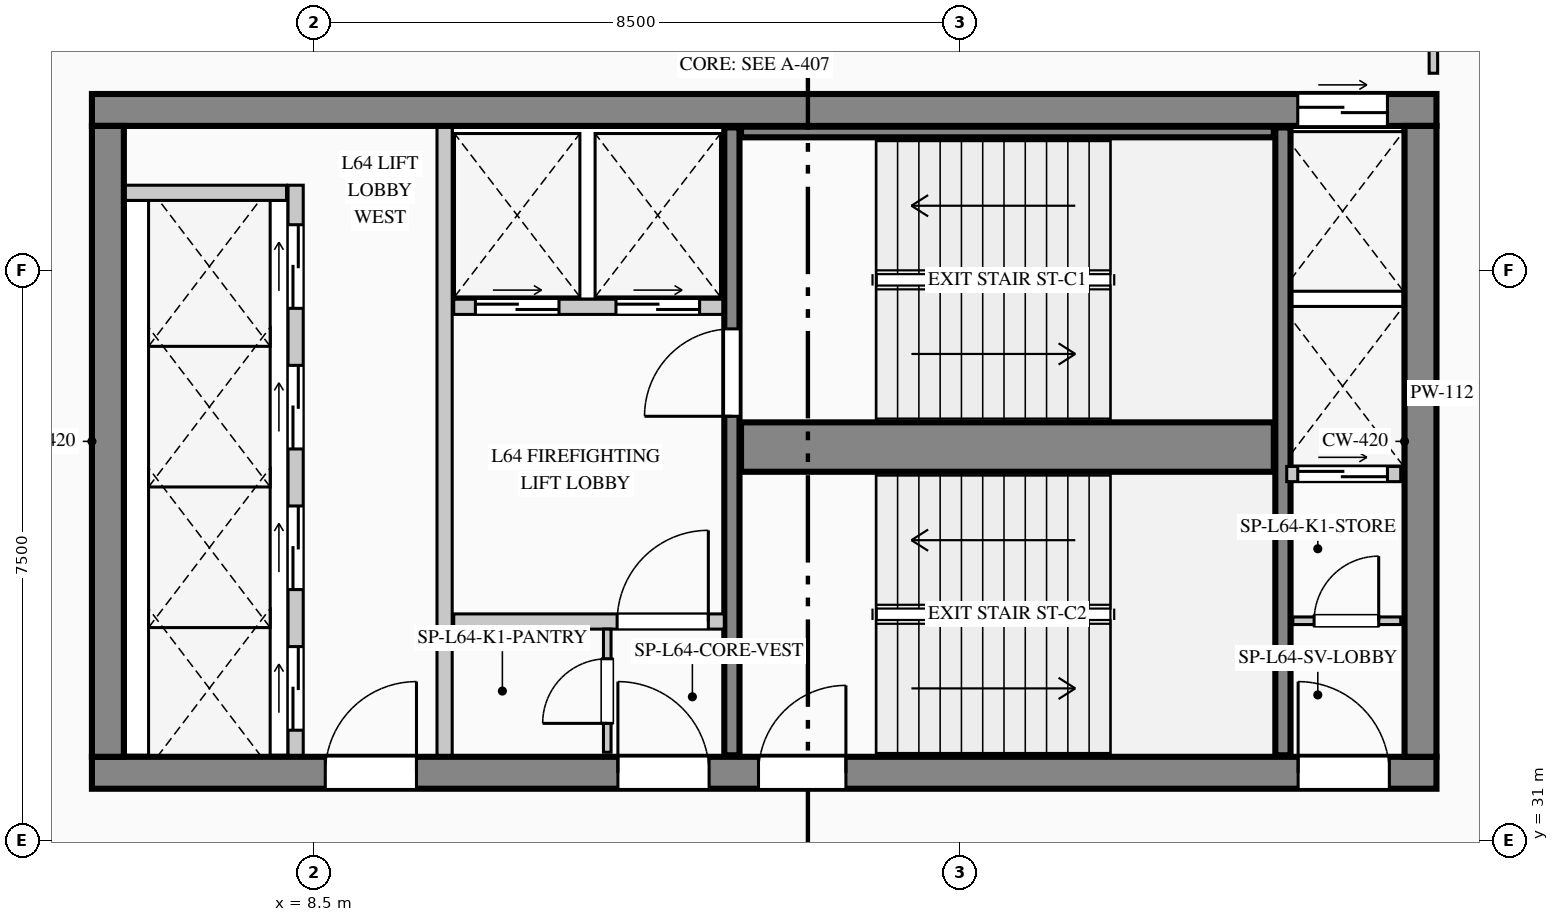
"""IFC4 building model, lengths in metres.
Left out: names, types, materials, properties, quantities, classifications, styles, units other than length and angle.
Written with IfcOpenShell. Run it as: python <this file> out.ifc"""

import sys

from ifc_helpers import new_model, si_unit, direction, frame, frame_2d, origin, place, context, subcontext, project, spatial, rectangle, extrude, element, fill, save


model = new_model("IFC4")
c1 = context("Model", 3, precision=1e-05, world=origin(), true_north=direction((0.0, 1.0)))
c2 = subcontext(c1, "Body", "Model", "MODEL_VIEW")
j1 = project(units=[si_unit("LENGTHUNIT", "METRE"), si_unit("PLANEANGLEUNIT", "RADIAN")], contexts=[c1])
p1 = place(None, origin())
s1 = spatial("IfcSite", under=j1, at=p1, CompositionType="ELEMENT")
p2 = place(p1, origin())
s2 = spatial("IfcBuilding", under=s1, at=p2, CompositionType="ELEMENT")
p3 = place(p2, frame((0.0, 0.0, 268.55)))
s3 = spatial("IfcBuildingStorey", under=s2, at=p3, CompositionType="ELEMENT", Elevation=268.55)
p4 = place(p3, frame((5.58, 40.61, 0.0), z_axis=(0.0, 0.0, 1.0), x_axis=(1.0, 0.0, 0.0)))
e1 = element("IfcWall", 1, at=p4, inside=s3, PredefinedType="SHEAR", context=c2, shape_type="SweptSolid", body=[
    extrude(rectangle(XDim=17.69, YDim=0.42, at=frame_2d((8.845, 0.0))), origin(), (0.0, 0.0, 1.0), 3.95),
])
p5 = place(p4, frame((15.865, 0.0, 0.0)))
e2 = element("IfcOpeningElement", 2, at=p5, cuts=e1, PredefinedType="OPENING", context=c2, shape_type="SweptSolid", body=[
    extrude(rectangle(XDim=1.18, YDim=2.25, at=frame_2d((0.59, 1.125))), frame((0.0, 0.22, 0.0), z_axis=(0.0, -1.0, 0.0), x_axis=(1.0, 0.0, 0.0)), (0.0, 0.0, 1.0), 0.44),
])
p6 = place(p3, frame((5.58, 31.89, 0.0), z_axis=(0.0, 0.0, 1.0), x_axis=(1.0, 0.0, 0.0)))
e3 = element("IfcWall", 3, at=p6, inside=s3, PredefinedType="SHEAR", context=c2, shape_type="SweptSolid", body=[
    extrude(rectangle(XDim=17.69, YDim=0.42, at=frame_2d((8.845, 0.0))), origin(), (0.0, 0.0, 1.0), 3.95),
])
p7 = place(p6, frame((3.07, 0.0, 0.0)))
e4 = element("IfcOpeningElement", 4, at=p7, cuts=e3, PredefinedType="OPENING", context=c2, shape_type="SweptSolid", body=[
    extrude(rectangle(XDim=1.2, YDim=2.2, at=frame_2d((0.6, 1.1))), frame((0.0, 0.22, 0.0), z_axis=(0.0, -1.0, 0.0), x_axis=(1.0, 0.0, 0.0)), (0.0, 0.0, 1.0), 0.44),
])
p8 = place(p6, frame((6.92, 0.0, 0.0)))
e5 = element("IfcOpeningElement", 5, at=p8, cuts=e3, PredefinedType="OPENING", context=c2, shape_type="SweptSolid", body=[
    extrude(rectangle(XDim=1.2, YDim=2.2, at=frame_2d((0.6, 1.1))), frame((0.0, 0.22, 0.0), z_axis=(0.0, -1.0, 0.0), x_axis=(1.0, 0.0, 0.0)), (0.0, 0.0, 1.0), 0.44),
])
p9 = place(p6, frame((8.77, 0.0, 0.0)))
e6 = element("IfcOpeningElement", 6, at=p9, cuts=e3, PredefinedType="OPENING", context=c2, shape_type="SweptSolid", body=[
    extrude(rectangle(XDim=1.15, YDim=2.2, at=frame_2d((0.575, 1.1))), frame((0.0, 0.22, 0.0), z_axis=(0.0, -1.0, 0.0), x_axis=(1.0, 0.0, 0.0)), (0.0, 0.0, 1.0), 0.44),
])
p10 = place(p6, frame((15.87, 0.0, 0.0)))
e7 = element("IfcOpeningElement", 7, at=p10, cuts=e3, PredefinedType="OPENING", context=c2, shape_type="SweptSolid", body=[
    extrude(rectangle(XDim=1.2, YDim=2.2, at=frame_2d((0.6, 1.1))), frame((0.0, 0.22, 0.0), z_axis=(0.0, -1.0, 0.0), x_axis=(1.0, 0.0, 0.0)), (0.0, 0.0, 1.0), 0.44),
])
for number, where, z_axis, x_axis in (
    (8, (5.79, 32.1, 0.0), (0.0, 0.0, 1.0), (0.0, 1.0, 0.0)),
    (9, (23.06, 32.1, 0.0), (0.0, 0.0, 1.0), (0.0, 1.0, 0.0)),
):
    element("IfcWall", number, at=place(p3, frame(where, z_axis=z_axis, x_axis=x_axis)), inside=s3, PredefinedType="SHEAR", context=c2, shape_type="SweptSolid", body=[
        extrude(rectangle(XDim=8.3, YDim=0.42, at=frame_2d((4.15, 0.0))), origin(), (0.0, 0.0, 1.0), 3.95),
    ])
p11 = place(p3, frame((14.0, 32.12, 0.0), z_axis=(0.0, 0.0, 1.0), x_axis=(0.0, 1.0, 0.0)))
e10 = element("IfcWall", 10, at=p11, inside=s3, PredefinedType="SHEAR", context=c2, shape_type="SweptSolid", body=[
    extrude(rectangle(XDim=8.26, YDim=0.2, at=frame_2d((4.13, 0.0))), origin(), (0.0, 0.0, 1.0), 3.95),
])
p12 = place(p11, frame((4.46, 0.0, 0.0)))
e11 = element("IfcOpeningElement", 11, at=p12, cuts=e10, PredefinedType="OPENING", context=c2, shape_type="SweptSolid", body=[
    extrude(rectangle(XDim=1.15, YDim=2.2, at=frame_2d((0.575, 1.1))), frame((0.0, 0.11, 0.0), z_axis=(0.0, -1.0, 0.0), x_axis=(1.0, 0.0, 0.0)), (0.0, 0.0, 1.0), 0.22),
])
p13 = place(p3, frame((14.12, 36.175, 0.0), z_axis=(0.0, 0.0, 1.0), x_axis=(1.0, 0.0, 0.0)))
e12 = element("IfcWall", 12, at=p13, inside=s3, PredefinedType="SHEAR", context=c2, shape_type="SweptSolid", body=[
    extrude(rectangle(XDim=7.01, YDim=0.65, at=frame_2d((3.505, 0.0))), origin(), (0.0, 0.0, 1.0), 3.95),
])
p14 = place(p3, frame((21.25, 32.12, 0.0), z_axis=(0.0, 0.0, 1.0), x_axis=(0.0, 1.0, 0.0)))
e13 = element("IfcWall", 13, at=p14, inside=s3, PredefinedType="SHEAR", context=c2, shape_type="SweptSolid", body=[
    extrude(rectangle(XDim=8.26, YDim=0.2, at=frame_2d((4.13, 0.0))), origin(), (0.0, 0.0, 1.0), 3.95),
])
p15 = place(p3, frame((14.12, 40.32, 0.0), z_axis=(0.0, 0.0, 1.0), x_axis=(1.0, 0.0, 0.0)))
e14 = element("IfcWall", 14, at=p15, inside=s3, PredefinedType="SHEAR", context=c2, shape_type="SweptSolid", body=[
    extrude(rectangle(XDim=7.01, YDim=0.14, at=frame_2d((3.505, 0.0))), origin(), (0.0, 0.0, 1.0), 3.95),
])
p16 = place(p3, frame((6.133, 4.42, 0.0), z_axis=(0.0, 0.0, 1.0), x_axis=(-0.089522678378, 0.995984784048, 0.0)))
e15 = element("IfcWall", 15, at=p16, inside=s3, PredefinedType="STANDARD", context=c2, shape_type="SweptSolid", body=[
    extrude(rectangle(XDim=37.31, YDim=0.24, at=frame_2d((18.655, 0.0))), origin(), (0.0, 0.0, 1.0), 3.7),
])
p17 = place(p16, frame((10.246, 0.0, 0.9)))
e16 = element("IfcOpeningElement", 16, at=p17, cuts=e15, PredefinedType="OPENING", context=c2, shape_type="SweptSolid", body=[
    extrude(rectangle(XDim=1.65, YDim=1.95, at=frame_2d((0.825, 0.975))), frame((0.0, 0.13, 0.0), z_axis=(0.0, -1.0, 0.0), x_axis=(1.0, 0.0, 0.0)), (0.0, 0.0, 1.0), 0.26),
])
p18 = place(p3, frame((8.26, 32.12, 0.0), z_axis=(0.0, 0.0, 1.0), x_axis=(0.0, 1.0, 0.0)))
e17 = element("IfcWall", 17, at=p18, inside=s3, PredefinedType="PARTITIONING", context=c2, shape_type="SweptSolid", body=[
    extrude(rectangle(XDim=7.5, YDim=0.2, at=frame_2d((3.75, 0.0))), origin(), (0.0, 0.0, 1.0), 3.7),
])
p19 = place(p18, frame((0.33, 0.0, 0.0)))
e18 = element("IfcOpeningElement", 18, at=p19, cuts=e17, PredefinedType="OPENING", context=c2, shape_type="SweptSolid", body=[
    extrude(rectangle(XDim=1.1, YDim=2.2, at=frame_2d((0.55, 1.1))), frame((0.0, 0.11, 0.0), z_axis=(0.0, -1.0, 0.0), x_axis=(1.0, 0.0, 0.0)), (0.0, 0.0, 1.0), 0.22),
])
p20 = place(p18, frame((2.18, 0.0, 0.0)))
e19 = element("IfcOpeningElement", 19, at=p20, cuts=e17, PredefinedType="OPENING", context=c2, shape_type="SweptSolid", body=[
    extrude(rectangle(XDim=1.1, YDim=2.2, at=frame_2d((0.55, 1.1))), frame((0.0, 0.11, 0.0), z_axis=(0.0, -1.0, 0.0), x_axis=(1.0, 0.0, 0.0)), (0.0, 0.0, 1.0), 0.22),
])
p21 = place(p18, frame((4.03, 0.0, 0.0)))
e20 = element("IfcOpeningElement", 20, at=p21, cuts=e17, PredefinedType="OPENING", context=c2, shape_type="SweptSolid", body=[
    extrude(rectangle(XDim=1.1, YDim=2.2, at=frame_2d((0.55, 1.1))), frame((0.0, 0.11, 0.0), z_axis=(0.0, -1.0, 0.0), x_axis=(1.0, 0.0, 0.0)), (0.0, 0.0, 1.0), 0.22),
])
p22 = place(p18, frame((5.88, 0.0, 0.0)))
e21 = element("IfcOpeningElement", 21, at=p22, cuts=e17, PredefinedType="OPENING", context=c2, shape_type="SweptSolid", body=[
    extrude(rectangle(XDim=1.1, YDim=2.2, at=frame_2d((0.55, 1.1))), frame((0.0, 0.11, 0.0), z_axis=(0.0, -1.0, 0.0), x_axis=(1.0, 0.0, 0.0)), (0.0, 0.0, 1.0), 0.22),
])
p23 = place(p3, frame((6.02, 39.52, 0.0), z_axis=(0.0, 0.0, 1.0), x_axis=(1.0, 0.0, 0.0)))
e22 = element("IfcWall", 22, at=p23, inside=s3, PredefinedType="PARTITIONING", context=c2, shape_type="SweptSolid", body=[
    extrude(rectangle(XDim=2.12, YDim=0.2, at=frame_2d((1.06, 0.0))), origin(), (0.0, 0.0, 1.0), 3.7),
])
p24 = place(p3, frame((10.22, 32.12, 0.0), z_axis=(0.0, 0.0, 1.0), x_axis=(0.0, 1.0, 0.0)))
e23 = element("IfcWall", 23, at=p24, inside=s3, PredefinedType="PARTITIONING", context=c2, shape_type="SweptSolid", body=[
    extrude(rectangle(XDim=8.26, YDim=0.2, at=frame_2d((4.13, 0.0))), origin(), (0.0, 0.0, 1.0), 3.7),
])
p25 = place(p3, frame((10.34, 38.02, 0.0), z_axis=(0.0, 0.0, 1.0), x_axis=(1.0, 0.0, 0.0)))
e24 = element("IfcWall", 24, at=p25, inside=s3, PredefinedType="PARTITIONING", context=c2, shape_type="SweptSolid", body=[
    extrude(rectangle(XDim=3.54, YDim=0.2, at=frame_2d((1.77, 0.0))), origin(), (0.0, 0.0, 1.0), 3.7),
])
p26 = place(p25, frame((0.285, 0.0, 0.0)))
e25 = element("IfcOpeningElement", 25, at=p26, cuts=e24, PredefinedType="OPENING", context=c2, shape_type="SweptSolid", body=[
    extrude(rectangle(XDim=1.1, YDim=2.2, at=frame_2d((0.55, 1.1))), frame((0.0, 0.11, 0.0), z_axis=(0.0, -1.0, 0.0), x_axis=(1.0, 0.0, 0.0)), (0.0, 0.0, 1.0), 0.22),
])
p27 = place(p25, frame((2.135, 0.0, 0.0)))
e26 = element("IfcOpeningElement", 26, at=p27, cuts=e24, PredefinedType="OPENING", context=c2, shape_type="SweptSolid", body=[
    extrude(rectangle(XDim=1.1, YDim=2.2, at=frame_2d((0.55, 1.1))), frame((0.0, 0.11, 0.0), z_axis=(0.0, -1.0, 0.0), x_axis=(1.0, 0.0, 0.0)), (0.0, 0.0, 1.0), 0.22),
])
p28 = place(p3, frame((10.34, 33.88, 0.0), z_axis=(0.0, 0.0, 1.0), x_axis=(1.0, 0.0, 0.0)))
e27 = element("IfcWall", 27, at=p28, inside=s3, PredefinedType="PARTITIONING", context=c2, shape_type="SweptSolid", body=[
    extrude(rectangle(XDim=3.56, YDim=0.2, at=frame_2d((1.78, 0.0))), origin(), (0.0, 0.0, 1.0), 3.7),
])
p29 = place(p28, frame((2.15, 0.0, 0.0)))
e28 = element("IfcOpeningElement", 28, at=p29, cuts=e27, PredefinedType="OPENING", context=c2, shape_type="SweptSolid", body=[
    extrude(rectangle(XDim=1.2, YDim=2.2, at=frame_2d((0.6, 1.1))), frame((0.0, 0.11, 0.0), z_axis=(0.0, -1.0, 0.0), x_axis=(1.0, 0.0, 0.0)), (0.0, 0.0, 1.0), 0.22),
])
p30 = place(p3, frame((12.36, 32.16, 0.0), z_axis=(0.0, 0.0, 1.0), x_axis=(0.0, 1.0, 0.0)))
e29 = element("IfcWall", 29, at=p30, inside=s3, PredefinedType="PARTITIONING", context=c2, shape_type="SweptSolid", body=[
    extrude(rectangle(XDim=1.62, YDim=0.1, at=frame_2d((0.81, 0.0))), origin(), (0.0, 0.0, 1.0), 3.7),
])
p31 = place(p30, frame((0.38, 0.0, 0.0)))
e30 = element("IfcOpeningElement", 30, at=p31, cuts=e29, PredefinedType="OPENING", context=c2, shape_type="SweptSolid", body=[
    extrude(rectangle(XDim=0.85, YDim=2.1, at=frame_2d((0.425, 1.05))), frame((0.0, 0.06, 0.0), z_axis=(0.0, -1.0, 0.0), x_axis=(1.0, 0.0, 0.0)), (0.0, 0.0, 1.0), 0.12),
])
p32 = place(p3, frame((21.38, 33.89, 0.0), z_axis=(0.0, 0.0, 1.0), x_axis=(1.0, 0.0, 0.0)))
e31 = element("IfcWall", 31, at=p32, inside=s3, PredefinedType="PARTITIONING", context=c2, shape_type="SweptSolid", body=[
    extrude(rectangle(XDim=1.42, YDim=0.1, at=frame_2d((0.71, 0.0))), origin(), (0.0, 0.0, 1.0), 3.7),
])
p33 = place(p32, frame((0.28, 0.0, 0.0)))
e32 = element("IfcOpeningElement", 32, at=p33, cuts=e31, PredefinedType="OPENING", context=c2, shape_type="SweptSolid", body=[
    extrude(rectangle(XDim=0.85, YDim=2.1, at=frame_2d((0.425, 1.05))), frame((0.0, 0.06, 0.0), z_axis=(0.0, -1.0, 0.0), x_axis=(1.0, 0.0, 0.0)), (0.0, 0.0, 1.0), 0.12),
])
p34 = place(p3, frame((21.3, 35.82, 0.0), z_axis=(0.0, 0.0, 1.0), x_axis=(1.0, 0.0, 0.0)))
e33 = element("IfcWall", 33, at=p34, inside=s3, PredefinedType="PARTITIONING", context=c2, shape_type="SweptSolid", body=[
    extrude(rectangle(XDim=1.5, YDim=0.2, at=frame_2d((0.75, 0.0))), origin(), (0.0, 0.0, 1.0), 3.7),
])
p35 = place(p34, frame((0.145, 0.0, 0.0)))
e34 = element("IfcOpeningElement", 34, at=p35, cuts=e33, PredefinedType="OPENING", context=c2, shape_type="SweptSolid", body=[
    extrude(rectangle(XDim=1.18, YDim=2.25, at=frame_2d((0.59, 1.125))), frame((0.0, 0.11, 0.0), z_axis=(0.0, -1.0, 0.0), x_axis=(1.0, 0.0, 0.0)), (0.0, 0.0, 1.0), 0.22),
])
p36 = place(p3, frame((23.23, 41.093, 0.0), z_axis=(0.0, 0.0, 1.0), x_axis=(-0.002685455238, 0.999996394159, 0.0)))
e35 = element("IfcWall", 35, at=p36, inside=s3, PredefinedType="PARTITIONING", context=c2, shape_type="SweptSolid", body=[
    extrude(rectangle(XDim=2.182, YDim=0.112, at=frame_2d((1.091, 0.0))), origin(), (0.0, 0.0, 1.0), 3.7),
])
p37 = place(p7, origin())
e36 = element("IfcDoor", 36, at=p37, inside=s3, OperationType="SINGLE_SWING_RIGHT", PredefinedType="DOOR", context=c2, shape_type="SweptSolid", body=[
    extrude(rectangle(XDim=1.2, YDim=2.2, at=frame_2d((0.6, 1.1))), frame((0.0, 0.025, 0.0), z_axis=(0.0, -1.0, 0.0), x_axis=(1.0, 0.0, 0.0)), (0.0, 0.0, 1.0), 0.05),
])
fill(e4, e36)
p38 = place(p8, origin())
e37 = element("IfcDoor", 37, at=p38, inside=s3, OperationType="SINGLE_SWING_LEFT", PredefinedType="DOOR", context=c2, shape_type="SweptSolid", body=[
    extrude(rectangle(XDim=1.2, YDim=2.2, at=frame_2d((0.6, 1.1))), frame((0.0, 0.025, 0.0), z_axis=(0.0, -1.0, 0.0), x_axis=(1.0, 0.0, 0.0)), (0.0, 0.0, 1.0), 0.05),
])
fill(e5, e37)
p39 = place(p9, origin())
e38 = element("IfcDoor", 38, at=p39, inside=s3, OperationType="SINGLE_SWING_RIGHT", PredefinedType="DOOR", context=c2, shape_type="SweptSolid", body=[
    extrude(rectangle(XDim=1.15, YDim=2.2, at=frame_2d((0.575, 1.1))), frame((0.0, 0.025, 0.0), z_axis=(0.0, -1.0, 0.0), x_axis=(1.0, 0.0, 0.0)), (0.0, 0.0, 1.0), 0.05),
])
fill(e6, e38)
p40 = place(p10, origin())
e39 = element("IfcDoor", 39, at=p40, inside=s3, OperationType="SINGLE_SWING_LEFT", PredefinedType="DOOR", context=c2, shape_type="SweptSolid", body=[
    extrude(rectangle(XDim=1.2, YDim=2.2, at=frame_2d((0.6, 1.1))), frame((0.0, 0.025, 0.0), z_axis=(0.0, -1.0, 0.0), x_axis=(1.0, 0.0, 0.0)), (0.0, 0.0, 1.0), 0.05),
])
fill(e7, e39)
p41 = place(p29, origin())
e40 = element("IfcDoor", 40, at=p41, inside=s3, OperationType="SINGLE_SWING_RIGHT", PredefinedType="DOOR", context=c2, shape_type="SweptSolid", body=[
    extrude(rectangle(XDim=1.2, YDim=2.2, at=frame_2d((0.6, 1.1))), frame((0.0, 0.025, 0.0), z_axis=(0.0, -1.0, 0.0), x_axis=(1.0, 0.0, 0.0)), (0.0, 0.0, 1.0), 0.05),
])
fill(e28, e40)
p42 = place(p31, origin())
e41 = element("IfcDoor", 41, at=p42, inside=s3, OperationType="SINGLE_SWING_LEFT", PredefinedType="DOOR", context=c2, shape_type="SweptSolid", body=[
    extrude(rectangle(XDim=0.85, YDim=2.1, at=frame_2d((0.425, 1.05))), frame((0.0, 0.025, 0.0), z_axis=(0.0, -1.0, 0.0), x_axis=(1.0, 0.0, 0.0)), (0.0, 0.0, 1.0), 0.05),
])
fill(e30, e41)
p43 = place(p33, origin())
e42 = element("IfcDoor", 42, at=p43, inside=s3, OperationType="SINGLE_SWING_RIGHT", PredefinedType="DOOR", context=c2, shape_type="SweptSolid", body=[
    extrude(rectangle(XDim=0.85, YDim=2.1, at=frame_2d((0.425, 1.05))), frame((0.0, 0.025, 0.0), z_axis=(0.0, -1.0, 0.0), x_axis=(1.0, 0.0, 0.0)), (0.0, 0.0, 1.0), 0.05),
])
fill(e32, e42)
p44 = place(p12, origin())
e43 = element("IfcDoor", 43, at=p44, inside=s3, OperationType="SINGLE_SWING_LEFT", PredefinedType="DOOR", context=c2, shape_type="SweptSolid", body=[
    extrude(rectangle(XDim=1.15, YDim=2.2, at=frame_2d((0.575, 1.1))), frame((0.0, 0.025, 0.0), z_axis=(0.0, -1.0, 0.0), x_axis=(1.0, 0.0, 0.0)), (0.0, 0.0, 1.0), 0.05),
])
fill(e11, e43)
p45 = place(p19, origin())
e44 = element("IfcDoor", 44, at=p45, inside=s3, OperationType="DOUBLE_DOOR_SLIDING", PredefinedType="DOOR", context=c2, shape_type="SweptSolid", body=[
    extrude(rectangle(XDim=1.1, YDim=2.2, at=frame_2d((0.55, 1.1))), frame((0.0, 0.025, 0.0), z_axis=(0.0, -1.0, 0.0), x_axis=(1.0, 0.0, 0.0)), (0.0, 0.0, 1.0), 0.05),
])
fill(e18, e44)
p46 = place(p20, origin())
e45 = element("IfcDoor", 45, at=p46, inside=s3, OperationType="DOUBLE_DOOR_SLIDING", PredefinedType="DOOR", context=c2, shape_type="SweptSolid", body=[
    extrude(rectangle(XDim=1.1, YDim=2.2, at=frame_2d((0.55, 1.1))), frame((0.0, 0.025, 0.0), z_axis=(0.0, -1.0, 0.0), x_axis=(1.0, 0.0, 0.0)), (0.0, 0.0, 1.0), 0.05),
])
fill(e19, e45)
p47 = place(p21, origin())
e46 = element("IfcDoor", 46, at=p47, inside=s3, OperationType="DOUBLE_DOOR_SLIDING", PredefinedType="DOOR", context=c2, shape_type="SweptSolid", body=[
    extrude(rectangle(XDim=1.1, YDim=2.2, at=frame_2d((0.55, 1.1))), frame((0.0, 0.025, 0.0), z_axis=(0.0, -1.0, 0.0), x_axis=(1.0, 0.0, 0.0)), (0.0, 0.0, 1.0), 0.05),
])
fill(e20, e46)
p48 = place(p22, origin())
e47 = element("IfcDoor", 47, at=p48, inside=s3, OperationType="DOUBLE_DOOR_SLIDING", PredefinedType="DOOR", context=c2, shape_type="SweptSolid", body=[
    extrude(rectangle(XDim=1.1, YDim=2.2, at=frame_2d((0.55, 1.1))), frame((0.0, 0.025, 0.0), z_axis=(0.0, -1.0, 0.0), x_axis=(1.0, 0.0, 0.0)), (0.0, 0.0, 1.0), 0.05),
])
fill(e21, e47)
p49 = place(p26, origin())
e48 = element("IfcDoor", 48, at=p49, inside=s3, OperationType="DOUBLE_DOOR_SLIDING", PredefinedType="DOOR", context=c2, shape_type="SweptSolid", body=[
    extrude(rectangle(XDim=1.1, YDim=2.2, at=frame_2d((0.55, 1.1))), frame((0.0, 0.025, 0.0), z_axis=(0.0, -1.0, 0.0), x_axis=(1.0, 0.0, 0.0)), (0.0, 0.0, 1.0), 0.05),
])
fill(e25, e48)
p50 = place(p27, origin())
e49 = element("IfcDoor", 49, at=p50, inside=s3, OperationType="DOUBLE_DOOR_SLIDING", PredefinedType="DOOR", context=c2, shape_type="SweptSolid", body=[
    extrude(rectangle(XDim=1.1, YDim=2.2, at=frame_2d((0.55, 1.1))), frame((0.0, 0.025, 0.0), z_axis=(0.0, -1.0, 0.0), x_axis=(1.0, 0.0, 0.0)), (0.0, 0.0, 1.0), 0.05),
])
fill(e26, e49)
p51 = place(p5, origin())
e50 = element("IfcDoor", 50, at=p51, inside=s3, OperationType="DOUBLE_DOOR_SLIDING", PredefinedType="DOOR", context=c2, shape_type="SweptSolid", body=[
    extrude(rectangle(XDim=1.18, YDim=2.25, at=frame_2d((0.59, 1.125))), frame((0.0, 0.025, 0.0), z_axis=(0.0, -1.0, 0.0), x_axis=(1.0, 0.0, 0.0)), (0.0, 0.0, 1.0), 0.05),
])
fill(e2, e50)
p52 = place(p35, origin())
e51 = element("IfcDoor", 51, at=p52, inside=s3, OperationType="DOUBLE_DOOR_SLIDING", PredefinedType="DOOR", context=c2, shape_type="SweptSolid", body=[
    extrude(rectangle(XDim=1.18, YDim=2.25, at=frame_2d((0.59, 1.125))), frame((0.0, 0.025, 0.0), z_axis=(0.0, -1.0, 0.0), x_axis=(1.0, 0.0, 0.0)), (0.0, 0.0, 1.0), 0.05),
])
fill(e34, e51)
save(model, sys.argv[1])
